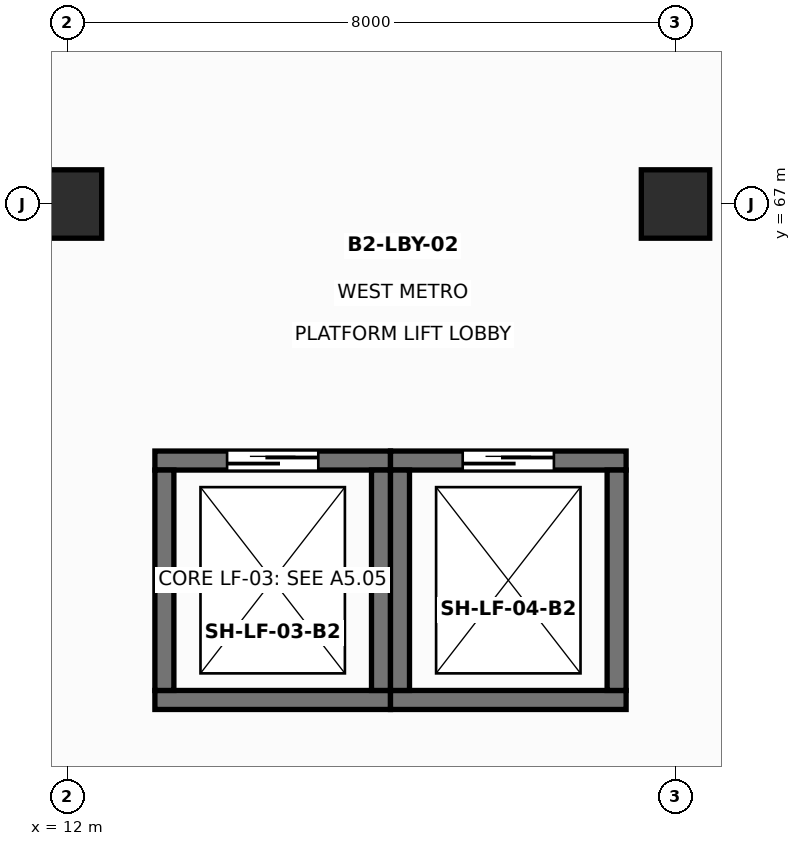
"""IFC4 building model, lengths in metres.
Left out: names, types, materials, properties, quantities, classifications, styles, units other than length and angle.
Written with IfcOpenShell. Run it as: python <this file> out.ifc"""

import sys

from ifc_helpers import new_model, si_unit, direction, frame, frame_2d, origin, origin_2d, place, context, subcontext, project, spatial, rectangle, extrude, element, fill, save


model = new_model("IFC4")
c1 = context("Model", 3, precision=1e-05, world=origin(), true_north=direction((0.0, 1.0)))
c2 = subcontext(c1, "Body", "Model", "MODEL_VIEW")
j1 = project(units=[si_unit("LENGTHUNIT", "METRE"), si_unit("PLANEANGLEUNIT", "RADIAN")], contexts=[c1])
p1 = place(None, origin())
s1 = spatial("IfcSite", under=j1, at=p1, CompositionType="ELEMENT")
p2 = place(p1, origin())
s2 = spatial("IfcBuilding", under=s1, at=p2, CompositionType="ELEMENT")
p3 = place(p2, frame((0.0, 0.0, -11.2)))
s3 = spatial("IfcBuildingStorey", under=s2, at=p3, CompositionType="ELEMENT", Elevation=-11.2)
for number, where, z_axis, x_axis in (
    (1, (12.0, 67.0, 0.0), (0.0, 0.0, 1.0), (1.0, 0.0, 0.0)),
    (2, (20.0, 67.0, 0.0), (0.0, 0.0, 1.0), (1.0, 0.0, 0.0)),
):
    element("IfcColumn", number, at=place(p3, frame(where, z_axis=z_axis, x_axis=x_axis)), inside=s3, PredefinedType="COLUMN", context=c2, shape_type="SweptSolid", body=[
        extrude(rectangle(XDim=0.9, YDim=0.9, at=origin_2d()), origin(), (0.0, 0.0, 1.0), 5.6),
    ])
p4 = place(p3, frame((13.15, 60.475, 0.0), z_axis=(0.0, 0.0, 1.0), x_axis=(1.0, 0.0, 0.0)))
e3 = element("IfcWall", 3, at=p4, inside=s3, PredefinedType="SOLIDWALL", context=c2, shape_type="SweptSolid", body=[
    extrude(rectangle(XDim=3.1, YDim=0.25, at=frame_2d((1.55, 0.0))), origin(), (0.0, 0.0, 1.0), 5.235),
])
p5 = place(p3, frame((16.25, 63.625, 0.0), z_axis=(0.0, 0.0, 1.0), x_axis=(-1.0, 0.0, 0.0)))
e4 = element("IfcWall", 4, at=p5, inside=s3, PredefinedType="SOLIDWALL", context=c2, shape_type="SweptSolid", body=[
    extrude(rectangle(XDim=3.1, YDim=0.25, at=frame_2d((1.55, 0.0))), origin(), (0.0, 0.0, 1.0), 5.235),
])
p6 = place(p5, frame((0.95, 0.0, 0.0)))
e5 = element("IfcOpeningElement", 5, at=p6, cuts=e4, PredefinedType="OPENING", context=c2, shape_type="SweptSolid", body=[
    extrude(rectangle(XDim=1.2, YDim=2.2, at=frame_2d((0.6, 1.1))), frame((0.0, 0.135, 0.0), z_axis=(0.0, -1.0, 0.0), x_axis=(1.0, 0.0, 0.0)), (0.0, 0.0, 1.0), 0.27),
])
for number, where, z_axis, x_axis in (
    (6, (16.125, 60.6, 0.0), (0.0, 0.0, 1.0), (0.0, 1.0, 0.0)),
    (7, (13.275, 63.5, 0.0), (0.0, 0.0, 1.0), (0.0, -1.0, 0.0)),
):
    element("IfcWall", number, at=place(p3, frame(where, z_axis=z_axis, x_axis=x_axis)), inside=s3, PredefinedType="SOLIDWALL", context=c2, shape_type="SweptSolid", body=[
        extrude(rectangle(XDim=2.9, YDim=0.25, at=frame_2d((1.45, 0.0))), origin(), (0.0, 0.0, 1.0), 5.235),
    ])
p7 = place(p3, frame((16.25, 60.475, 0.0), z_axis=(0.0, 0.0, 1.0), x_axis=(1.0, 0.0, 0.0)))
e8 = element("IfcWall", 8, at=p7, inside=s3, PredefinedType="SOLIDWALL", context=c2, shape_type="SweptSolid", body=[
    extrude(rectangle(XDim=3.1, YDim=0.25, at=frame_2d((1.55, 0.0))), origin(), (0.0, 0.0, 1.0), 5.235),
])
p8 = place(p3, frame((19.35, 63.625, 0.0), z_axis=(0.0, 0.0, 1.0), x_axis=(-1.0, 0.0, 0.0)))
e9 = element("IfcWall", 9, at=p8, inside=s3, PredefinedType="SOLIDWALL", context=c2, shape_type="SweptSolid", body=[
    extrude(rectangle(XDim=3.1, YDim=0.25, at=frame_2d((1.55, 0.0))), origin(), (0.0, 0.0, 1.0), 5.235),
])
p9 = place(p8, frame((0.95, 0.0, 0.0)))
e10 = element("IfcOpeningElement", 10, at=p9, cuts=e9, PredefinedType="OPENING", context=c2, shape_type="SweptSolid", body=[
    extrude(rectangle(XDim=1.2, YDim=2.2, at=frame_2d((0.6, 1.1))), frame((0.0, 0.135, 0.0), z_axis=(0.0, -1.0, 0.0), x_axis=(1.0, 0.0, 0.0)), (0.0, 0.0, 1.0), 0.27),
])
for number, where, z_axis, x_axis in (
    (11, (19.225, 60.6, 0.0), (0.0, 0.0, 1.0), (0.0, 1.0, 0.0)),
    (12, (16.375, 63.5, 0.0), (0.0, 0.0, 1.0), (0.0, -1.0, 0.0)),
):
    element("IfcWall", number, at=place(p3, frame(where, z_axis=z_axis, x_axis=x_axis)), inside=s3, PredefinedType="SOLIDWALL", context=c2, shape_type="SweptSolid", body=[
        extrude(rectangle(XDim=2.9, YDim=0.25, at=frame_2d((1.45, 0.0))), origin(), (0.0, 0.0, 1.0), 5.235),
    ])
p10 = place(p6, frame((1.2, 0.0, 0.0), z_axis=(0.0, 0.0, 1.0), x_axis=(-1.0, 0.0, 0.0)))
e13 = element("IfcDoor", 13, at=p10, inside=s3, OperationType="DOUBLE_DOOR_SLIDING", PredefinedType="DOOR", context=c2, shape_type="SweptSolid", body=[
    extrude(rectangle(XDim=1.2, YDim=2.2, at=frame_2d((0.6, 1.1))), frame((0.0, 0.025, 0.0), z_axis=(0.0, -1.0, 0.0), x_axis=(1.0, 0.0, 0.0)), (0.0, 0.0, 1.0), 0.05),
])
fill(e5, e13)
p11 = place(p9, frame((1.2, 0.0, 0.0), z_axis=(0.0, 0.0, 1.0), x_axis=(-1.0, 0.0, 0.0)))
e14 = element("IfcDoor", 14, at=p11, inside=s3, OperationType="DOUBLE_DOOR_SLIDING", PredefinedType="DOOR", context=c2, shape_type="SweptSolid", body=[
    extrude(rectangle(XDim=1.2, YDim=2.2, at=frame_2d((0.6, 1.1))), frame((0.0, 0.025, 0.0), z_axis=(0.0, -1.0, 0.0), x_axis=(1.0, 0.0, 0.0)), (0.0, 0.0, 1.0), 0.05),
])
fill(e10, e14)
save(model, sys.argv[1])
